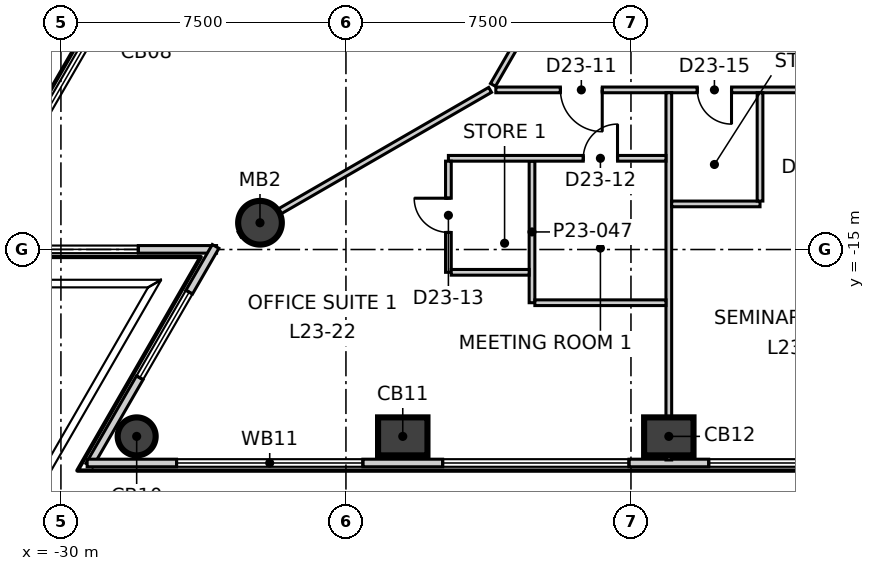
"""IFC4 building model, lengths in metres.
Left out: names, types, materials, properties, quantities, classifications, styles, units other than length and angle.
Written with IfcOpenShell. Run it as: python <this file> out.ifc"""

import sys

from ifc_helpers import new_model, si_unit, direction, frame, frame_2d, origin, origin_2d, place, context, subcontext, project, spatial, rectangle, circle, extrude, element, fill, save


model = new_model("IFC4")
c1 = context("Model", 3, precision=1e-05, world=origin(), true_north=direction((0.0, 1.0)))
c2 = subcontext(c1, "Body", "Model", "MODEL_VIEW")
j1 = project(units=[si_unit("LENGTHUNIT", "METRE"), si_unit("PLANEANGLEUNIT", "RADIAN")], contexts=[c1])
p1 = place(None, origin())
s1 = spatial("IfcSite", under=j1, at=p1, CompositionType="ELEMENT")
p2 = place(p1, origin())
s2 = spatial("IfcBuilding", under=s1, at=p2, CompositionType="ELEMENT")
p3 = place(p2, frame((0.0, 0.0, 104.3)))
s3 = spatial("IfcBuildingStorey", under=s2, at=p3, CompositionType="ELEMENT", Elevation=104.3)
p4 = place(p3, frame((-28.007, -19.917, -0.3), z_axis=(0.0, 0.0, 1.0), x_axis=(1.0, 0.0, 0.0)))
e1 = element("IfcColumn", 1, at=p4, inside=s3, PredefinedType="COLUMN", context=c2, shape_type="SweptSolid", body=[
    extrude(circle(Radius=0.5, at=origin_2d()), origin(), (0.0, 0.0, 1.0), 4.0),
])
for number, where, z_axis, x_axis in (
    (2, (-21.005, -19.917, -0.3), (0.0, 0.0, 1.0), (1.0, 0.0, 0.0)),
    (3, (-14.004, -19.917, -0.3), (0.0, 0.0, 1.0), (1.0, 0.0, 0.0)),
):
    element("IfcColumn", number, at=place(p3, frame(where, z_axis=z_axis, x_axis=x_axis)), inside=s3, PredefinedType="COLUMN", context=c2, shape_type="SweptSolid", body=[
        extrude(rectangle(XDim=1.3, YDim=1.0, at=origin_2d()), origin(), (0.0, 0.0, 1.0), 4.0),
    ])
p5 = place(p3, frame((-24.762, -14.296, -0.3), z_axis=(0.0, 0.0, 1.0), x_axis=(1.0, 0.0, 0.0)))
e4 = element("IfcColumn", 4, at=p5, inside=s3, PredefinedType="COLUMN", context=c2, shape_type="SweptSolid", body=[
    extrude(circle(Radius=0.575, at=origin_2d()), origin(), (0.0, 0.0, 1.0), 4.0),
])
p6 = place(p3, frame((-3.2, 35.691, 0.0), z_axis=(0.0, 0.0, 1.0), x_axis=(-0.500010127185, -0.866019556773, 0.0)))
e5 = element("IfcWall", 5, at=p6, inside=s3, PredefinedType="ELEMENTEDWALL", context=c2, shape_type="SweptSolid", body=[
    extrude(rectangle(XDim=58.599, YDim=0.2, at=frame_2d((29.299, 0.0))), origin(), (0.0, 0.0, 1.0), 3.7),
])
p7 = place(p6, frame((2.353, 0.0, 0.9)))
e6 = element("IfcOpeningElement", 6, at=p7, cuts=e5, PredefinedType="OPENING", context=c2, shape_type="SweptSolid", body=[
    extrude(rectangle(XDim=4.9, YDim=2.5, at=frame_2d((2.45, 1.25))), frame((0.0, 0.11, 0.0), z_axis=(0.0, -1.0, 0.0), x_axis=(1.0, 0.0, 0.0)), (0.0, 0.0, 1.0), 0.22),
])
p8 = place(p6, frame((9.355, 0.0, 0.9)))
e7 = element("IfcOpeningElement", 7, at=p8, cuts=e5, PredefinedType="OPENING", context=c2, shape_type="SweptSolid", body=[
    extrude(rectangle(XDim=4.9, YDim=2.5, at=frame_2d((2.45, 1.25))), frame((0.0, 0.11, 0.0), z_axis=(0.0, -1.0, 0.0), x_axis=(1.0, 0.0, 0.0)), (0.0, 0.0, 1.0), 0.22),
])
p9 = place(p6, frame((16.357, 0.0, 0.9)))
e8 = element("IfcOpeningElement", 8, at=p9, cuts=e5, PredefinedType="OPENING", context=c2, shape_type="SweptSolid", body=[
    extrude(rectangle(XDim=4.9, YDim=2.5, at=frame_2d((2.45, 1.25))), frame((0.0, 0.11, 0.0), z_axis=(0.0, -1.0, 0.0), x_axis=(1.0, 0.0, 0.0)), (0.0, 0.0, 1.0), 0.22),
])
p10 = place(p6, frame((23.358, 0.0, 0.9)))
e9 = element("IfcOpeningElement", 9, at=p10, cuts=e5, PredefinedType="OPENING", context=c2, shape_type="SweptSolid", body=[
    extrude(rectangle(XDim=4.9, YDim=2.5, at=frame_2d((2.45, 1.25))), frame((0.0, 0.11, 0.0), z_axis=(0.0, -1.0, 0.0), x_axis=(1.0, 0.0, 0.0)), (0.0, 0.0, 1.0), 0.22),
])
p11 = place(p6, frame((30.36, 0.0, 0.9)))
e10 = element("IfcOpeningElement", 10, at=p11, cuts=e5, PredefinedType="OPENING", context=c2, shape_type="SweptSolid", body=[
    extrude(rectangle(XDim=4.9, YDim=2.5, at=frame_2d((2.45, 1.25))), frame((0.0, 0.11, 0.0), z_axis=(0.0, -1.0, 0.0), x_axis=(1.0, 0.0, 0.0)), (0.0, 0.0, 1.0), 0.22),
])
p12 = place(p6, frame((37.362, 0.0, 0.9)))
e11 = element("IfcOpeningElement", 11, at=p12, cuts=e5, PredefinedType="OPENING", context=c2, shape_type="SweptSolid", body=[
    extrude(rectangle(XDim=4.9, YDim=2.5, at=frame_2d((2.45, 1.25))), frame((0.0, 0.11, 0.0), z_axis=(0.0, -1.0, 0.0), x_axis=(1.0, 0.0, 0.0)), (0.0, 0.0, 1.0), 0.22),
])
p13 = place(p6, frame((44.363, 0.0, 0.9)))
e12 = element("IfcOpeningElement", 12, at=p13, cuts=e5, PredefinedType="OPENING", context=c2, shape_type="SweptSolid", body=[
    extrude(rectangle(XDim=4.9, YDim=2.5, at=frame_2d((2.45, 1.25))), frame((0.0, 0.11, 0.0), z_axis=(0.0, -1.0, 0.0), x_axis=(1.0, 0.0, 0.0)), (0.0, 0.0, 1.0), 0.22),
])
p14 = place(p6, frame((51.365, 0.0, 0.9)))
e13 = element("IfcOpeningElement", 13, at=p14, cuts=e5, PredefinedType="OPENING", context=c2, shape_type="SweptSolid", body=[
    extrude(rectangle(XDim=4.9, YDim=2.5, at=frame_2d((2.45, 1.25))), frame((0.0, 0.11, 0.0), z_axis=(0.0, -1.0, 0.0), x_axis=(1.0, 0.0, 0.0)), (0.0, 0.0, 1.0), 0.22),
])
p15 = place(p3, frame((-32.555, -14.996, 0.0), z_axis=(0.0, 0.0, 1.0), x_axis=(1.0, 0.0, 0.0)))
e14 = element("IfcWall", 14, at=p15, inside=s3, PredefinedType="ELEMENTEDWALL", context=c2, shape_type="SweptSolid", body=[
    extrude(rectangle(XDim=6.65, YDim=0.2, at=frame_2d((3.325, 0.0))), origin(), (0.0, 0.0, 1.0), 3.7),
])
p16 = place(p15, frame((1.99, 0.0, 0.9)))
e15 = element("IfcOpeningElement", 15, at=p16, cuts=e14, PredefinedType="OPENING", context=c2, shape_type="SweptSolid", body=[
    extrude(rectangle(XDim=2.6, YDim=2.5, at=frame_2d((1.3, 1.25))), frame((0.0, 0.11, 0.0), z_axis=(0.0, -1.0, 0.0), x_axis=(1.0, 0.0, 0.0)), (0.0, 0.0, 1.0), 0.22),
])
p17 = place(p3, frame((-25.93, -14.918, 0.0), z_axis=(0.0, 0.0, 1.0), x_axis=(-0.499933237632, -0.866063945624, 0.0)))
e16 = element("IfcWall", 16, at=p17, inside=s3, PredefinedType="ELEMENTEDWALL", context=c2, shape_type="SweptSolid", body=[
    extrude(rectangle(XDim=6.651, YDim=0.2, at=frame_2d((3.325, 0.0))), origin(), (0.0, 0.0, 1.0), 3.7),
])
p18 = place(p17, frame((1.39, 0.0, 0.9)))
e17 = element("IfcOpeningElement", 17, at=p18, cuts=e16, PredefinedType="OPENING", context=c2, shape_type="SweptSolid", body=[
    extrude(rectangle(XDim=2.6, YDim=2.5, at=frame_2d((1.3, 1.25))), frame((0.0, 0.11, 0.0), z_axis=(0.0, -1.0, 0.0), x_axis=(1.0, 0.0, 0.0)), (0.0, 0.0, 1.0), 0.22),
])
p19 = place(p3, frame((-29.31, -20.617, 0.0), z_axis=(0.0, 0.0, 1.0), x_axis=(1.0, 0.0, 0.0)))
e18 = element("IfcWall", 18, at=p19, inside=s3, PredefinedType="ELEMENTEDWALL", context=c2, shape_type="SweptSolid", body=[
    extrude(rectangle(XDim=58.6, YDim=0.2, at=frame_2d((29.3, 0.0))), origin(), (0.0, 0.0, 1.0), 3.7),
])
p20 = place(p19, frame((2.354, 0.0, 0.9)))
e19 = element("IfcOpeningElement", 19, at=p20, cuts=e18, PredefinedType="OPENING", context=c2, shape_type="SweptSolid", body=[
    extrude(rectangle(XDim=4.9, YDim=2.5, at=frame_2d((2.45, 1.25))), frame((0.0, 0.11, 0.0), z_axis=(0.0, -1.0, 0.0), x_axis=(1.0, 0.0, 0.0)), (0.0, 0.0, 1.0), 0.22),
])
p21 = place(p19, frame((9.356, 0.0, 0.9)))
e20 = element("IfcOpeningElement", 20, at=p21, cuts=e18, PredefinedType="OPENING", context=c2, shape_type="SweptSolid", body=[
    extrude(rectangle(XDim=4.9, YDim=2.5, at=frame_2d((2.45, 1.25))), frame((0.0, 0.11, 0.0), z_axis=(0.0, -1.0, 0.0), x_axis=(1.0, 0.0, 0.0)), (0.0, 0.0, 1.0), 0.22),
])
p22 = place(p19, frame((16.357, 0.0, 0.9)))
e21 = element("IfcOpeningElement", 21, at=p22, cuts=e18, PredefinedType="OPENING", context=c2, shape_type="SweptSolid", body=[
    extrude(rectangle(XDim=4.9, YDim=2.5, at=frame_2d((2.45, 1.25))), frame((0.0, 0.11, 0.0), z_axis=(0.0, -1.0, 0.0), x_axis=(1.0, 0.0, 0.0)), (0.0, 0.0, 1.0), 0.22),
])
p23 = place(p19, frame((23.359, 0.0, 0.9)))
e22 = element("IfcOpeningElement", 22, at=p23, cuts=e18, PredefinedType="OPENING", context=c2, shape_type="SweptSolid", body=[
    extrude(rectangle(XDim=4.9, YDim=2.5, at=frame_2d((2.45, 1.25))), frame((0.0, 0.11, 0.0), z_axis=(0.0, -1.0, 0.0), x_axis=(1.0, 0.0, 0.0)), (0.0, 0.0, 1.0), 0.22),
])
p24 = place(p19, frame((30.361, 0.0, 0.9)))
e23 = element("IfcOpeningElement", 23, at=p24, cuts=e18, PredefinedType="OPENING", context=c2, shape_type="SweptSolid", body=[
    extrude(rectangle(XDim=4.9, YDim=2.5, at=frame_2d((2.45, 1.25))), frame((0.0, 0.11, 0.0), z_axis=(0.0, -1.0, 0.0), x_axis=(1.0, 0.0, 0.0)), (0.0, 0.0, 1.0), 0.22),
])
p25 = place(p19, frame((37.363, 0.0, 0.9)))
e24 = element("IfcOpeningElement", 24, at=p25, cuts=e18, PredefinedType="OPENING", context=c2, shape_type="SweptSolid", body=[
    extrude(rectangle(XDim=4.9, YDim=2.5, at=frame_2d((2.45, 1.25))), frame((0.0, 0.11, 0.0), z_axis=(0.0, -1.0, 0.0), x_axis=(1.0, 0.0, 0.0)), (0.0, 0.0, 1.0), 0.22),
])
p26 = place(p19, frame((44.364, 0.0, 0.9)))
e25 = element("IfcOpeningElement", 25, at=p26, cuts=e18, PredefinedType="OPENING", context=c2, shape_type="SweptSolid", body=[
    extrude(rectangle(XDim=4.9, YDim=2.5, at=frame_2d((2.45, 1.25))), frame((0.0, 0.11, 0.0), z_axis=(0.0, -1.0, 0.0), x_axis=(1.0, 0.0, 0.0)), (0.0, 0.0, 1.0), 0.22),
])
p27 = place(p19, frame((51.366, 0.0, 0.9)))
e26 = element("IfcOpeningElement", 26, at=p27, cuts=e18, PredefinedType="OPENING", context=c2, shape_type="SweptSolid", body=[
    extrude(rectangle(XDim=4.9, YDim=2.5, at=frame_2d((2.45, 1.25))), frame((0.0, 0.11, 0.0), z_axis=(0.0, -1.0, 0.0), x_axis=(1.0, 0.0, 0.0)), (0.0, 0.0, 1.0), 0.22),
])
p28 = place(p3, frame((-25.299, -14.606, 0.0), z_axis=(0.0, 0.0, 1.0), x_axis=(0.866002408008, 0.500039827738, 0.0)))
e27 = element("IfcWall", 27, at=p28, inside=s3, PredefinedType="PARTITIONING", context=c2, shape_type="SweptSolid", body=[
    extrude(rectangle(XDim=7.613, YDim=0.15, at=frame_2d((3.807, 0.0))), origin(), (0.0, 0.0, 1.0), 3.15),
])
p29 = place(p3, frame((-18.556, -10.8, 0.0), z_axis=(0.0, 0.0, 1.0), x_axis=(1.0, 0.0, 0.0)))
e28 = element("IfcWall", 28, at=p29, inside=s3, PredefinedType="PARTITIONING", context=c2, shape_type="SweptSolid", body=[
    extrude(rectangle(XDim=10.653, YDim=0.15, at=frame_2d((5.326, 0.0))), origin(), (0.0, 0.0, 1.0), 3.7),
])
p30 = place(p29, frame((1.7, 0.0, 0.0)))
e29 = element("IfcOpeningElement", 29, at=p30, cuts=e28, PredefinedType="OPENING", context=c2, shape_type="SweptSolid", body=[
    extrude(rectangle(XDim=1.1, YDim=2.1, at=frame_2d((0.55, 1.05))), frame((0.0, 0.085, 0.0), z_axis=(0.0, -1.0, 0.0), x_axis=(1.0, 0.0, 0.0)), (0.0, 0.0, 1.0), 0.17),
])
p31 = place(p29, frame((5.302, 0.0, 0.0)))
e30 = element("IfcOpeningElement", 30, at=p31, cuts=e28, PredefinedType="OPENING", context=c2, shape_type="SweptSolid", body=[
    extrude(rectangle(XDim=0.9, YDim=2.1, at=frame_2d((0.45, 1.05))), frame((0.0, 0.085, 0.0), z_axis=(0.0, -1.0, 0.0), x_axis=(1.0, 0.0, 0.0)), (0.0, 0.0, 1.0), 0.17),
])
p32 = place(p3, frame((-18.631, -10.669, 0.0), z_axis=(0.0, 0.0, 1.0), x_axis=(0.500015596868, 0.866016398741, 0.0)))
e31 = element("IfcWall", 31, at=p32, inside=s3, PredefinedType="PARTITIONING", context=c2, shape_type="SweptSolid", body=[
    extrude(rectangle(XDim=24.656, YDim=0.15, at=frame_2d((12.328, 0.0))), origin(), (0.0, 0.0, 1.0), 3.7),
])
p33 = place(p32, frame((17.507, 0.0, 0.0)))
e32 = element("IfcOpeningElement", 32, at=p33, cuts=e31, PredefinedType="OPENING", context=c2, shape_type="SweptSolid", body=[
    extrude(rectangle(XDim=1.1, YDim=2.1, at=frame_2d((0.55, 1.05))), frame((0.0, 0.085, 0.0), z_axis=(0.0, -1.0, 0.0), x_axis=(1.0, 0.0, 0.0)), (0.0, 0.0, 1.0), 0.17),
])
p34 = place(p32, frame((5.104, 0.0, 0.0)))
e33 = element("IfcOpeningElement", 33, at=p34, cuts=e31, PredefinedType="OPENING", context=c2, shape_type="SweptSolid", body=[
    extrude(rectangle(XDim=1.1, YDim=2.1, at=frame_2d((0.55, 1.05))), frame((0.0, 0.085, 0.0), z_axis=(0.0, -1.0, 0.0), x_axis=(1.0, 0.0, 0.0)), (0.0, 0.0, 1.0), 0.17),
])
p35 = place(p3, frame((-14.004, -20.537, 0.0), z_axis=(0.0, 0.0, 1.0), x_axis=(0.0, 1.0, 0.0)))
e34 = element("IfcWall", 34, at=p35, inside=s3, PredefinedType="PARTITIONING", context=c2, shape_type="SweptSolid", body=[
    extrude(rectangle(XDim=9.662, YDim=0.15, at=frame_2d((4.831, 0.0))), origin(), (0.0, 0.0, 1.0), 3.7),
])
p36 = place(p3, frame((-13.929, -13.8, 0.0), z_axis=(0.0, 0.0, 1.0), x_axis=(1.0, 0.0, 0.0)))
e35 = element("IfcWall", 35, at=p36, inside=s3, PredefinedType="PARTITIONING", context=c2, shape_type="SweptSolid", body=[
    extrude(rectangle(XDim=2.325, YDim=0.15, at=frame_2d((1.163, 0.0))), origin(), (0.0, 0.0, 1.0), 3.7),
])
p37 = place(p3, frame((-11.604, -13.725, 0.0), z_axis=(0.0, 0.0, 1.0), x_axis=(0.0, 1.0, 0.0)))
e36 = element("IfcWall", 36, at=p37, inside=s3, PredefinedType="PARTITIONING", context=c2, shape_type="SweptSolid", body=[
    extrude(rectangle(XDim=2.85, YDim=0.15, at=frame_2d((1.425, 0.0))), origin(), (0.0, 0.0, 1.0), 3.7),
])
p38 = place(p3, frame((-17.604, -16.4, 0.0), z_axis=(0.0, 0.0, 1.0), x_axis=(0.0, 1.0, 0.0)))
e37 = element("IfcWall", 37, at=p38, inside=s3, PredefinedType="PARTITIONING", context=c2, shape_type="SweptSolid", body=[
    extrude(rectangle(XDim=3.725, YDim=0.15, at=frame_2d((1.862, 0.0))), origin(), (0.0, 0.0, 1.0), 3.7),
])
p39 = place(p3, frame((-19.804, -12.6, 0.0), z_axis=(0.0, 0.0, 1.0), x_axis=(1.0, 0.0, 0.0)))
e38 = element("IfcWall", 38, at=p39, inside=s3, PredefinedType="PARTITIONING", context=c2, shape_type="SweptSolid", body=[
    extrude(rectangle(XDim=5.725, YDim=0.15, at=frame_2d((2.862, 0.0))), origin(), (0.0, 0.0, 1.0), 3.7),
])
p40 = place(p39, frame((3.55, 0.0, 0.0)))
e39 = element("IfcOpeningElement", 39, at=p40, cuts=e38, PredefinedType="OPENING", context=c2, shape_type="SweptSolid", body=[
    extrude(rectangle(XDim=0.9, YDim=2.1, at=frame_2d((0.45, 1.05))), frame((0.0, 0.085, 0.0), z_axis=(0.0, -1.0, 0.0), x_axis=(1.0, 0.0, 0.0)), (0.0, 0.0, 1.0), 0.17),
])
p41 = place(p3, frame((-19.804, -15.6, 0.0), z_axis=(0.0, 0.0, 1.0), x_axis=(0.0, 1.0, 0.0)))
e40 = element("IfcWall", 40, at=p41, inside=s3, PredefinedType="PARTITIONING", context=c2, shape_type="SweptSolid", body=[
    extrude(rectangle(XDim=2.925, YDim=0.15, at=frame_2d((1.462, 0.0))), origin(), (0.0, 0.0, 1.0), 3.7),
])
p42 = place(p41, frame((1.05, 0.0, 0.0)))
e41 = element("IfcOpeningElement", 41, at=p42, cuts=e40, PredefinedType="OPENING", context=c2, shape_type="SweptSolid", body=[
    extrude(rectangle(XDim=0.9, YDim=2.1, at=frame_2d((0.45, 1.05))), frame((0.0, 0.085, 0.0), z_axis=(0.0, -1.0, 0.0), x_axis=(1.0, 0.0, 0.0)), (0.0, 0.0, 1.0), 0.17),
])
p43 = place(p3, frame((-19.729, -15.6, 0.0), z_axis=(0.0, 0.0, 1.0), x_axis=(1.0, 0.0, 0.0)))
e42 = element("IfcWall", 42, at=p43, inside=s3, PredefinedType="PARTITIONING", context=c2, shape_type="SweptSolid", body=[
    extrude(rectangle(XDim=2.05, YDim=0.15, at=frame_2d((1.025, 0.0))), origin(), (0.0, 0.0, 1.0), 3.7),
])
p44 = place(p3, frame((-17.529, -16.4, 0.0), z_axis=(0.0, 0.0, 1.0), x_axis=(1.0, 0.0, 0.0)))
e43 = element("IfcWall", 43, at=p44, inside=s3, PredefinedType="PARTITIONING", context=c2, shape_type="SweptSolid", body=[
    extrude(rectangle(XDim=3.45, YDim=0.15, at=frame_2d((1.725, 0.0))), origin(), (0.0, 0.0, 1.0), 3.7),
])
p45 = place(p14, origin())
e44 = element("IfcWindow", 44, at=p45, inside=s3, PartitioningType="SINGLE_PANEL", PredefinedType="WINDOW", context=c2, shape_type="SweptSolid", body=[
    extrude(rectangle(XDim=4.9, YDim=2.5, at=frame_2d((2.45, 1.25))), frame((0.0, 0.03, 0.0), z_axis=(0.0, -1.0, 0.0), x_axis=(1.0, 0.0, 0.0)), (0.0, 0.0, 1.0), 0.06),
])
fill(e13, e44)
p46 = place(p16, origin())
e45 = element("IfcWindow", 45, at=p46, inside=s3, PartitioningType="SINGLE_PANEL", PredefinedType="WINDOW", context=c2, shape_type="SweptSolid", body=[
    extrude(rectangle(XDim=2.6, YDim=2.5, at=frame_2d((1.3, 1.25))), frame((0.0, 0.03, 0.0), z_axis=(0.0, -1.0, 0.0), x_axis=(1.0, 0.0, 0.0)), (0.0, 0.0, 1.0), 0.06),
])
fill(e15, e45)
p47 = place(p18, origin())
e46 = element("IfcWindow", 46, at=p47, inside=s3, PartitioningType="SINGLE_PANEL", PredefinedType="WINDOW", context=c2, shape_type="SweptSolid", body=[
    extrude(rectangle(XDim=2.6, YDim=2.5, at=frame_2d((1.3, 1.25))), frame((0.0, 0.03, 0.0), z_axis=(0.0, -1.0, 0.0), x_axis=(1.0, 0.0, 0.0)), (0.0, 0.0, 1.0), 0.06),
])
fill(e17, e46)
p48 = place(p20, origin())
e47 = element("IfcWindow", 47, at=p48, inside=s3, PartitioningType="SINGLE_PANEL", PredefinedType="WINDOW", context=c2, shape_type="SweptSolid", body=[
    extrude(rectangle(XDim=4.9, YDim=2.5, at=frame_2d((2.45, 1.25))), frame((0.0, 0.03, 0.0), z_axis=(0.0, -1.0, 0.0), x_axis=(1.0, 0.0, 0.0)), (0.0, 0.0, 1.0), 0.06),
])
fill(e19, e47)
p49 = place(p21, origin())
e48 = element("IfcWindow", 48, at=p49, inside=s3, PartitioningType="SINGLE_PANEL", PredefinedType="WINDOW", context=c2, shape_type="SweptSolid", body=[
    extrude(rectangle(XDim=4.9, YDim=2.5, at=frame_2d((2.45, 1.25))), frame((0.0, 0.03, 0.0), z_axis=(0.0, -1.0, 0.0), x_axis=(1.0, 0.0, 0.0)), (0.0, 0.0, 1.0), 0.06),
])
fill(e20, e48)
p50 = place(p22, origin())
e49 = element("IfcWindow", 49, at=p50, inside=s3, PartitioningType="SINGLE_PANEL", PredefinedType="WINDOW", context=c2, shape_type="SweptSolid", body=[
    extrude(rectangle(XDim=4.9, YDim=2.5, at=frame_2d((2.45, 1.25))), frame((0.0, 0.03, 0.0), z_axis=(0.0, -1.0, 0.0), x_axis=(1.0, 0.0, 0.0)), (0.0, 0.0, 1.0), 0.06),
])
fill(e21, e49)
p51 = place(p30, origin())
e50 = element("IfcDoor", 50, at=p51, inside=s3, OperationType="SINGLE_SWING_RIGHT", PredefinedType="DOOR", context=c2, shape_type="SweptSolid", body=[
    extrude(rectangle(XDim=1.1, YDim=2.1, at=frame_2d((0.55, 1.05))), frame((0.0, 0.025, 0.0), z_axis=(0.0, -1.0, 0.0), x_axis=(1.0, 0.0, 0.0)), (0.0, 0.0, 1.0), 0.05),
])
fill(e29, e50)
p52 = place(p40, origin())
e51 = element("IfcDoor", 51, at=p52, inside=s3, OperationType="SINGLE_SWING_LEFT", PredefinedType="DOOR", context=c2, shape_type="SweptSolid", body=[
    extrude(rectangle(XDim=0.9, YDim=2.1, at=frame_2d((0.45, 1.05))), frame((0.0, 0.025, 0.0), z_axis=(0.0, -1.0, 0.0), x_axis=(1.0, 0.0, 0.0)), (0.0, 0.0, 1.0), 0.05),
])
fill(e39, e51)
p53 = place(p42, origin())
e52 = element("IfcDoor", 52, at=p53, inside=s3, OperationType="SINGLE_SWING_LEFT", PredefinedType="DOOR", context=c2, shape_type="SweptSolid", body=[
    extrude(rectangle(XDim=0.9, YDim=2.1, at=frame_2d((0.45, 1.05))), frame((0.0, 0.025, 0.0), z_axis=(0.0, -1.0, 0.0), x_axis=(1.0, 0.0, 0.0)), (0.0, 0.0, 1.0), 0.05),
])
fill(e41, e52)
p54 = place(p31, origin())
e53 = element("IfcDoor", 53, at=p54, inside=s3, OperationType="SINGLE_SWING_RIGHT", PredefinedType="DOOR", context=c2, shape_type="SweptSolid", body=[
    extrude(rectangle(XDim=0.9, YDim=2.1, at=frame_2d((0.45, 1.05))), frame((0.0, 0.025, 0.0), z_axis=(0.0, -1.0, 0.0), x_axis=(1.0, 0.0, 0.0)), (0.0, 0.0, 1.0), 0.05),
])
fill(e30, e53)
save(model, sys.argv[1])
